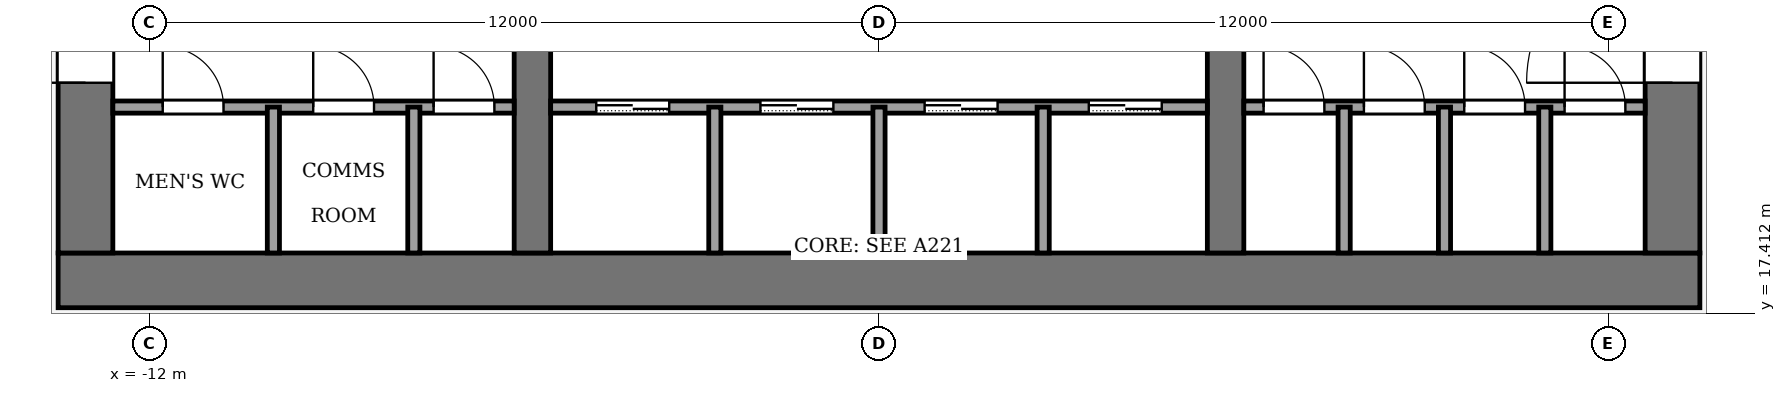
"""IFC4 building model, lengths in metres.
Left out: names, types, materials, properties, quantities, classifications, styles, units other than length and angle.
Written with IfcOpenShell. Run it as: python <this file> out.ifc"""

import sys

from ifc_helpers import new_model, si_unit, direction, frame, frame_2d, origin, place, context, subcontext, project, spatial, rectangle, extrude, element, fill, save


model = new_model("IFC4")
c1 = context("Model", 3, precision=1e-05, world=origin(), true_north=direction((0.0, 1.0)))
c2 = subcontext(c1, "Body", "Model", "MODEL_VIEW")
j1 = project(units=[si_unit("LENGTHUNIT", "METRE"), si_unit("PLANEANGLEUNIT", "RADIAN")], contexts=[c1])
p1 = place(None, origin())
s1 = spatial("IfcSite", under=j1, at=p1, CompositionType="ELEMENT")
p2 = place(p1, origin())
s2 = spatial("IfcBuilding", under=s1, at=p2, CompositionType="ELEMENT")
p3 = place(p2, frame((0.0, 0.0, 194.0)))
s3 = spatial("IfcBuildingStorey", under=s2, at=p3, CompositionType="ELEMENT", Elevation=194.0)
p4 = place(p3, frame((-13.5, 17.95, -0.13), z_axis=(0.0, 0.0, 1.0), x_axis=(1.0, 0.0, 0.0)))
e1 = element("IfcWall", 1, at=p4, inside=s3, PredefinedType="SHEAR", context=c2, shape_type="SweptSolid", body=[
    extrude(rectangle(XDim=27.0, YDim=0.9, at=frame_2d((13.5, 0.0))), origin(), (0.0, 0.0, 1.0), 4.0),
])
p5 = place(p3, frame((-13.05, 18.4, -0.13), z_axis=(0.0, 0.0, 1.0), x_axis=(0.0, 1.0, 0.0)))
e2 = element("IfcWall", 2, at=p5, inside=s3, PredefinedType="SHEAR", context=c2, shape_type="SweptSolid", body=[
    extrude(rectangle(XDim=19.2, YDim=0.9, at=frame_2d((9.6, 0.0))), origin(), (0.0, 0.0, 1.0), 4.0),
])
p6 = place(p5, frame((2.8, 0.0, 0.13)))
e3 = element("IfcOpeningElement", 3, at=p6, cuts=e2, PredefinedType="OPENING", context=c2, shape_type="SweptSolid", body=[
    extrude(rectangle(XDim=2.4, YDim=2.4, at=frame_2d((1.2, 1.2))), frame((0.0, 0.46, 0.0), z_axis=(0.0, -1.0, 0.0), x_axis=(1.0, 0.0, 0.0)), (0.0, 0.0, 1.0), 0.92),
])
p7 = place(p5, frame((13.4, 0.0, 0.13)))
e4 = element("IfcOpeningElement", 4, at=p7, cuts=e2, PredefinedType="OPENING", context=c2, shape_type="SweptSolid", body=[
    extrude(rectangle(XDim=1.4, YDim=2.2, at=frame_2d((0.7, 1.1))), frame((0.0, 0.46, 0.0), z_axis=(0.0, -1.0, 0.0), x_axis=(1.0, 0.0, 0.0)), (0.0, 0.0, 1.0), 0.92),
])
p8 = place(p3, frame((13.05, 18.4, -0.13), z_axis=(0.0, 0.0, 1.0), x_axis=(0.0, 1.0, 0.0)))
e5 = element("IfcWall", 5, at=p8, inside=s3, PredefinedType="SHEAR", context=c2, shape_type="SweptSolid", body=[
    extrude(rectangle(XDim=19.2, YDim=0.9, at=frame_2d((9.6, 0.0))), origin(), (0.0, 0.0, 1.0), 4.0),
])
p9 = place(p8, frame((2.8, 0.0, 0.13)))
e6 = element("IfcOpeningElement", 6, at=p9, cuts=e5, PredefinedType="OPENING", context=c2, shape_type="SweptSolid", body=[
    extrude(rectangle(XDim=2.4, YDim=2.4, at=frame_2d((1.2, 1.2))), frame((0.0, 0.46, 0.0), z_axis=(0.0, -1.0, 0.0), x_axis=(1.0, 0.0, 0.0)), (0.0, 0.0, 1.0), 0.92),
])
p10 = place(p8, frame((13.3, 0.0, 0.13)))
e7 = element("IfcOpeningElement", 7, at=p10, cuts=e5, PredefinedType="OPENING", context=c2, shape_type="SweptSolid", body=[
    extrude(rectangle(XDim=2.4, YDim=2.4, at=frame_2d((1.2, 1.2))), frame((0.0, 0.46, 0.0), z_axis=(0.0, -1.0, 0.0), x_axis=(1.0, 0.0, 0.0)), (0.0, 0.0, 1.0), 0.92),
])
p11 = place(p3, frame((-5.7, 18.4, -0.13), z_axis=(0.0, 0.0, 1.0), x_axis=(0.0, 1.0, 0.0)))
e8 = element("IfcWall", 8, at=p11, inside=s3, PredefinedType="SHEAR", context=c2, shape_type="SweptSolid", body=[
    extrude(rectangle(XDim=19.2, YDim=0.6, at=frame_2d((9.6, 0.0))), origin(), (0.0, 0.0, 1.0), 4.0),
])
p12 = place(p11, frame((8.35, 0.0, 0.13)))
e9 = element("IfcOpeningElement", 9, at=p12, cuts=e8, PredefinedType="OPENING", context=c2, shape_type="SweptSolid", body=[
    extrude(rectangle(XDim=0.9, YDim=2.1, at=frame_2d((0.45, 1.05))), frame((0.0, 0.31, 0.0), z_axis=(0.0, -1.0, 0.0), x_axis=(1.0, 0.0, 0.0)), (0.0, 0.0, 1.0), 0.62),
])
p13 = place(p3, frame((5.7, 18.4, -0.13), z_axis=(0.0, 0.0, 1.0), x_axis=(0.0, 1.0, 0.0)))
e10 = element("IfcWall", 10, at=p13, inside=s3, PredefinedType="SHEAR", context=c2, shape_type="SweptSolid", body=[
    extrude(rectangle(XDim=19.2, YDim=0.6, at=frame_2d((9.6, 0.0))), origin(), (0.0, 0.0, 1.0), 4.0),
])
p14 = place(p13, frame((13.3, 0.0, 0.13)))
e11 = element("IfcOpeningElement", 11, at=p14, cuts=e10, PredefinedType="OPENING", context=c2, shape_type="SweptSolid", body=[
    extrude(rectangle(XDim=2.4, YDim=2.4, at=frame_2d((1.2, 1.2))), frame((0.0, 0.31, 0.0), z_axis=(0.0, -1.0, 0.0), x_axis=(1.0, 0.0, 0.0)), (0.0, 0.0, 1.0), 0.62),
])
p15 = place(p3, frame((-12.6, 20.8, 0.0), z_axis=(0.0, 0.0, 1.0), x_axis=(1.0, 0.0, 0.0)))
e12 = element("IfcWall", 12, at=p15, inside=s3, PredefinedType="PARTITIONING", context=c2, shape_type="SweptSolid", body=[
    extrude(rectangle(XDim=6.6, YDim=0.2, at=frame_2d((3.3, 0.0))), origin(), (0.0, 0.0, 1.0), 3.87),
])
p16 = place(p15, frame((0.82, 0.0, 0.0)))
e13 = element("IfcOpeningElement", 13, at=p16, cuts=e12, PredefinedType="OPENING", context=c2, shape_type="SweptSolid", body=[
    extrude(rectangle(XDim=1.0, YDim=2.1, at=frame_2d((0.5, 1.05))), frame((0.0, 0.11, 0.0), z_axis=(0.0, -1.0, 0.0), x_axis=(1.0, 0.0, 0.0)), (0.0, 0.0, 1.0), 0.22),
])
p17 = place(p15, frame((3.295, 0.0, 0.0)))
e14 = element("IfcOpeningElement", 14, at=p17, cuts=e12, PredefinedType="OPENING", context=c2, shape_type="SweptSolid", body=[
    extrude(rectangle(XDim=1.0, YDim=2.1, at=frame_2d((0.5, 1.05))), frame((0.0, 0.11, 0.0), z_axis=(0.0, -1.0, 0.0), x_axis=(1.0, 0.0, 0.0)), (0.0, 0.0, 1.0), 0.22),
])
p18 = place(p15, frame((5.275, 0.0, 0.0)))
e15 = element("IfcOpeningElement", 15, at=p18, cuts=e12, PredefinedType="OPENING", context=c2, shape_type="SweptSolid", body=[
    extrude(rectangle(XDim=1.0, YDim=2.1, at=frame_2d((0.5, 1.05))), frame((0.0, 0.11, 0.0), z_axis=(0.0, -1.0, 0.0), x_axis=(1.0, 0.0, 0.0)), (0.0, 0.0, 1.0), 0.22),
])
p19 = place(p3, frame((-5.4, 20.8, 0.0), z_axis=(0.0, 0.0, 1.0), x_axis=(1.0, 0.0, 0.0)))
e16 = element("IfcWall", 16, at=p19, inside=s3, PredefinedType="PARTITIONING", context=c2, shape_type="SweptSolid", body=[
    extrude(rectangle(XDim=10.8, YDim=0.2, at=frame_2d((5.4, 0.0))), origin(), (0.0, 0.0, 1.0), 3.87),
])
p20 = place(p19, frame((0.75, 0.0, 0.0)))
e17 = element("IfcOpeningElement", 17, at=p20, cuts=e16, PredefinedType="OPENING", context=c2, shape_type="SweptSolid", body=[
    extrude(rectangle(XDim=1.2, YDim=2.2, at=frame_2d((0.6, 1.1))), frame((0.0, 0.11, 0.0), z_axis=(0.0, -1.0, 0.0), x_axis=(1.0, 0.0, 0.0)), (0.0, 0.0, 1.0), 0.22),
])
p21 = place(p19, frame((3.45, 0.0, 0.0)))
e18 = element("IfcOpeningElement", 18, at=p21, cuts=e16, PredefinedType="OPENING", context=c2, shape_type="SweptSolid", body=[
    extrude(rectangle(XDim=1.2, YDim=2.2, at=frame_2d((0.6, 1.1))), frame((0.0, 0.11, 0.0), z_axis=(0.0, -1.0, 0.0), x_axis=(1.0, 0.0, 0.0)), (0.0, 0.0, 1.0), 0.22),
])
p22 = place(p19, frame((6.15, 0.0, 0.0)))
e19 = element("IfcOpeningElement", 19, at=p22, cuts=e16, PredefinedType="OPENING", context=c2, shape_type="SweptSolid", body=[
    extrude(rectangle(XDim=1.2, YDim=2.2, at=frame_2d((0.6, 1.1))), frame((0.0, 0.11, 0.0), z_axis=(0.0, -1.0, 0.0), x_axis=(1.0, 0.0, 0.0)), (0.0, 0.0, 1.0), 0.22),
])
p23 = place(p19, frame((8.85, 0.0, 0.0)))
e20 = element("IfcOpeningElement", 20, at=p23, cuts=e16, PredefinedType="OPENING", context=c2, shape_type="SweptSolid", body=[
    extrude(rectangle(XDim=1.2, YDim=2.2, at=frame_2d((0.6, 1.1))), frame((0.0, 0.11, 0.0), z_axis=(0.0, -1.0, 0.0), x_axis=(1.0, 0.0, 0.0)), (0.0, 0.0, 1.0), 0.22),
])
p24 = place(p3, frame((6.0, 20.8, 0.0), z_axis=(0.0, 0.0, 1.0), x_axis=(1.0, 0.0, 0.0)))
e21 = element("IfcWall", 21, at=p24, inside=s3, PredefinedType="PARTITIONING", context=c2, shape_type="SweptSolid", body=[
    extrude(rectangle(XDim=6.6, YDim=0.2, at=frame_2d((3.3, 0.0))), origin(), (0.0, 0.0, 1.0), 3.87),
])
p25 = place(p24, frame((0.325, 0.0, 0.0)))
e22 = element("IfcOpeningElement", 22, at=p25, cuts=e21, PredefinedType="OPENING", context=c2, shape_type="SweptSolid", body=[
    extrude(rectangle(XDim=1.0, YDim=2.1, at=frame_2d((0.5, 1.05))), frame((0.0, 0.11, 0.0), z_axis=(0.0, -1.0, 0.0), x_axis=(1.0, 0.0, 0.0)), (0.0, 0.0, 1.0), 0.22),
])
p26 = place(p24, frame((1.975, 0.0, 0.0)))
e23 = element("IfcOpeningElement", 23, at=p26, cuts=e21, PredefinedType="OPENING", context=c2, shape_type="SweptSolid", body=[
    extrude(rectangle(XDim=1.0, YDim=2.1, at=frame_2d((0.5, 1.05))), frame((0.0, 0.11, 0.0), z_axis=(0.0, -1.0, 0.0), x_axis=(1.0, 0.0, 0.0)), (0.0, 0.0, 1.0), 0.22),
])
p27 = place(p24, frame((3.625, 0.0, 0.0)))
e24 = element("IfcOpeningElement", 24, at=p27, cuts=e21, PredefinedType="OPENING", context=c2, shape_type="SweptSolid", body=[
    extrude(rectangle(XDim=1.0, YDim=2.1, at=frame_2d((0.5, 1.05))), frame((0.0, 0.11, 0.0), z_axis=(0.0, -1.0, 0.0), x_axis=(1.0, 0.0, 0.0)), (0.0, 0.0, 1.0), 0.22),
])
p28 = place(p24, frame((5.275, 0.0, 0.0)))
e25 = element("IfcOpeningElement", 25, at=p28, cuts=e21, PredefinedType="OPENING", context=c2, shape_type="SweptSolid", body=[
    extrude(rectangle(XDim=1.0, YDim=2.1, at=frame_2d((0.5, 1.05))), frame((0.0, 0.11, 0.0), z_axis=(0.0, -1.0, 0.0), x_axis=(1.0, 0.0, 0.0)), (0.0, 0.0, 1.0), 0.22),
])
for number, where, z_axis, x_axis in (
    (26, (-9.96, 18.4, 0.0), (0.0, 0.0, 1.0), (0.0, 1.0, 0.0)),
    (27, (-7.65, 18.4, 0.0), (0.0, 0.0, 1.0), (0.0, 1.0, 0.0)),
    (28, (-2.7, 18.4, 0.0), (0.0, 0.0, 1.0), (0.0, 1.0, 0.0)),
    (29, (0.0, 18.4, 0.0), (0.0, 0.0, 1.0), (0.0, 1.0, 0.0)),
    (30, (2.7, 18.4, 0.0), (0.0, 0.0, 1.0), (0.0, 1.0, 0.0)),
    (31, (7.65, 18.4, 0.0), (0.0, 0.0, 1.0), (0.0, 1.0, 0.0)),
    (32, (9.3, 18.4, 0.0), (0.0, 0.0, 1.0), (0.0, 1.0, 0.0)),
    (33, (10.95, 18.4, 0.0), (0.0, 0.0, 1.0), (0.0, 1.0, 0.0)),
):
    element("IfcWall", number, at=place(p3, frame(where, z_axis=z_axis, x_axis=x_axis)), inside=s3, PredefinedType="PARTITIONING", context=c2, shape_type="SweptSolid", body=[
        extrude(rectangle(XDim=2.4, YDim=0.2, at=frame_2d((1.2, 0.0))), origin(), (0.0, 0.0, 1.0), 3.87),
    ])
p29 = place(p20, origin())
e34 = element("IfcDoor", 34, at=p29, inside=s3, OperationType="SLIDING_TO_LEFT", PredefinedType="DOOR", context=c2, shape_type="SweptSolid", body=[
    extrude(rectangle(XDim=1.2, YDim=2.2, at=frame_2d((0.6, 1.1))), frame((0.0, 0.025, 0.0), z_axis=(0.0, -1.0, 0.0), x_axis=(1.0, 0.0, 0.0)), (0.0, 0.0, 1.0), 0.05),
])
fill(e17, e34)
p30 = place(p21, origin())
e35 = element("IfcDoor", 35, at=p30, inside=s3, OperationType="SLIDING_TO_LEFT", PredefinedType="DOOR", context=c2, shape_type="SweptSolid", body=[
    extrude(rectangle(XDim=1.2, YDim=2.2, at=frame_2d((0.6, 1.1))), frame((0.0, 0.025, 0.0), z_axis=(0.0, -1.0, 0.0), x_axis=(1.0, 0.0, 0.0)), (0.0, 0.0, 1.0), 0.05),
])
fill(e18, e35)
p31 = place(p22, origin())
e36 = element("IfcDoor", 36, at=p31, inside=s3, OperationType="SLIDING_TO_LEFT", PredefinedType="DOOR", context=c2, shape_type="SweptSolid", body=[
    extrude(rectangle(XDim=1.2, YDim=2.2, at=frame_2d((0.6, 1.1))), frame((0.0, 0.025, 0.0), z_axis=(0.0, -1.0, 0.0), x_axis=(1.0, 0.0, 0.0)), (0.0, 0.0, 1.0), 0.05),
])
fill(e19, e36)
p32 = place(p23, origin())
e37 = element("IfcDoor", 37, at=p32, inside=s3, OperationType="SLIDING_TO_LEFT", PredefinedType="DOOR", context=c2, shape_type="SweptSolid", body=[
    extrude(rectangle(XDim=1.2, YDim=2.2, at=frame_2d((0.6, 1.1))), frame((0.0, 0.025, 0.0), z_axis=(0.0, -1.0, 0.0), x_axis=(1.0, 0.0, 0.0)), (0.0, 0.0, 1.0), 0.05),
])
fill(e20, e37)
p33 = place(p16, origin())
e38 = element("IfcDoor", 38, at=p33, inside=s3, OperationType="SINGLE_SWING_LEFT", PredefinedType="DOOR", context=c2, shape_type="SweptSolid", body=[
    extrude(rectangle(XDim=1.0, YDim=2.1, at=frame_2d((0.5, 1.05))), frame((0.0, 0.025, 0.0), z_axis=(0.0, -1.0, 0.0), x_axis=(1.0, 0.0, 0.0)), (0.0, 0.0, 1.0), 0.05),
])
fill(e13, e38)
p34 = place(p17, origin())
e39 = element("IfcDoor", 39, at=p34, inside=s3, OperationType="SINGLE_SWING_LEFT", PredefinedType="DOOR", context=c2, shape_type="SweptSolid", body=[
    extrude(rectangle(XDim=1.0, YDim=2.1, at=frame_2d((0.5, 1.05))), frame((0.0, 0.025, 0.0), z_axis=(0.0, -1.0, 0.0), x_axis=(1.0, 0.0, 0.0)), (0.0, 0.0, 1.0), 0.05),
])
fill(e14, e39)
p35 = place(p18, origin())
e40 = element("IfcDoor", 40, at=p35, inside=s3, OperationType="SINGLE_SWING_RIGHT", PredefinedType="DOOR", context=c2, shape_type="SweptSolid", body=[
    extrude(rectangle(XDim=1.0, YDim=2.1, at=frame_2d((0.5, 1.05))), frame((0.0, 0.025, 0.0), z_axis=(0.0, -1.0, 0.0), x_axis=(1.0, 0.0, 0.0)), (0.0, 0.0, 1.0), 0.05),
])
fill(e15, e40)
p36 = place(p25, origin())
e41 = element("IfcDoor", 41, at=p36, inside=s3, OperationType="SINGLE_SWING_LEFT", PredefinedType="DOOR", context=c2, shape_type="SweptSolid", body=[
    extrude(rectangle(XDim=1.0, YDim=2.1, at=frame_2d((0.5, 1.05))), frame((0.0, 0.025, 0.0), z_axis=(0.0, -1.0, 0.0), x_axis=(1.0, 0.0, 0.0)), (0.0, 0.0, 1.0), 0.05),
])
fill(e22, e41)
p37 = place(p26, origin())
e42 = element("IfcDoor", 42, at=p37, inside=s3, OperationType="SINGLE_SWING_LEFT", PredefinedType="DOOR", context=c2, shape_type="SweptSolid", body=[
    extrude(rectangle(XDim=1.0, YDim=2.1, at=frame_2d((0.5, 1.05))), frame((0.0, 0.025, 0.0), z_axis=(0.0, -1.0, 0.0), x_axis=(1.0, 0.0, 0.0)), (0.0, 0.0, 1.0), 0.05),
])
fill(e23, e42)
p38 = place(p27, origin())
e43 = element("IfcDoor", 43, at=p38, inside=s3, OperationType="SINGLE_SWING_RIGHT", PredefinedType="DOOR", context=c2, shape_type="SweptSolid", body=[
    extrude(rectangle(XDim=1.0, YDim=2.1, at=frame_2d((0.5, 1.05))), frame((0.0, 0.025, 0.0), z_axis=(0.0, -1.0, 0.0), x_axis=(1.0, 0.0, 0.0)), (0.0, 0.0, 1.0), 0.05),
])
fill(e24, e43)
p39 = place(p28, origin())
e44 = element("IfcDoor", 44, at=p39, inside=s3, OperationType="SINGLE_SWING_RIGHT", PredefinedType="DOOR", context=c2, shape_type="SweptSolid", body=[
    extrude(rectangle(XDim=1.0, YDim=2.1, at=frame_2d((0.5, 1.05))), frame((0.0, 0.025, 0.0), z_axis=(0.0, -1.0, 0.0), x_axis=(1.0, 0.0, 0.0)), (0.0, 0.0, 1.0), 0.05),
])
fill(e25, e44)
p40 = place(p6, origin())
e45 = element("IfcDoor", 45, at=p40, inside=s3, OperationType="DOUBLE_DOOR_SINGLE_SWING", PredefinedType="DOOR", context=c2, shape_type="SweptSolid", body=[
    extrude(rectangle(XDim=2.4, YDim=2.4, at=frame_2d((1.2, 1.2))), frame((0.0, 0.025, 0.0), z_axis=(0.0, -1.0, 0.0), x_axis=(1.0, 0.0, 0.0)), (0.0, 0.0, 1.0), 0.05),
])
fill(e3, e45)
p41 = place(p9, origin())
e46 = element("IfcDoor", 46, at=p41, inside=s3, OperationType="DOUBLE_DOOR_SINGLE_SWING", PredefinedType="DOOR", context=c2, shape_type="SweptSolid", body=[
    extrude(rectangle(XDim=2.4, YDim=2.4, at=frame_2d((1.2, 1.2))), frame((0.0, 0.025, 0.0), z_axis=(0.0, -1.0, 0.0), x_axis=(1.0, 0.0, 0.0)), (0.0, 0.0, 1.0), 0.05),
])
fill(e6, e46)
save(model, sys.argv[1])
